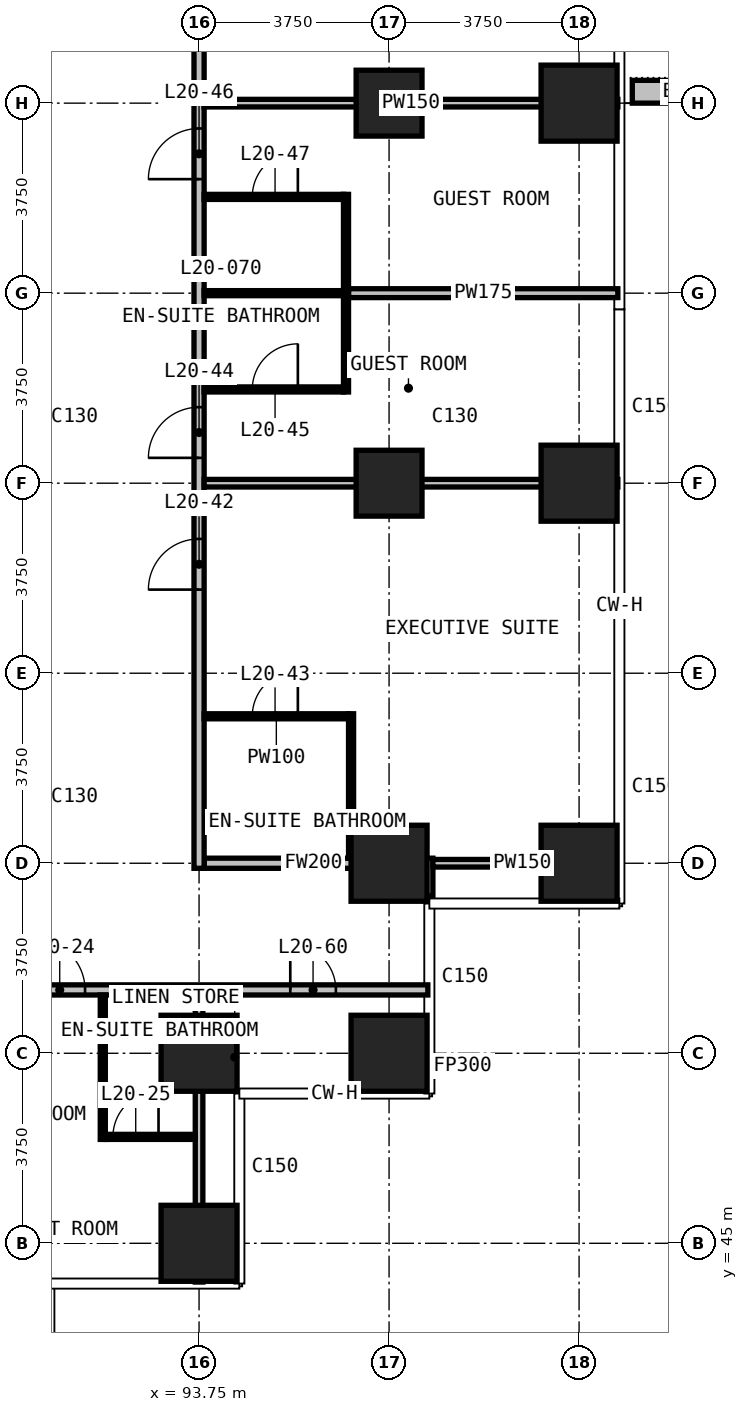
"""IFC4 building model, lengths in metres.
Left out: names, types, materials, properties, quantities, classifications, styles, units other than length and angle.
Written with IfcOpenShell. Run it as: python <this file> out.ifc"""

import sys

from ifc_helpers import new_model, si_unit, direction, frame, frame_2d, origin, origin_2d, place, context, subcontext, project, spatial, rectangle, extrude, element, fill, save


model = new_model("IFC4")
c1 = context("Model", 3, precision=1e-05, world=origin(), true_north=direction((0.0, 1.0)))
c2 = subcontext(c1, "Body", "Model", "MODEL_VIEW")
j1 = project(units=[si_unit("LENGTHUNIT", "METRE"), si_unit("PLANEANGLEUNIT", "RADIAN")], contexts=[c1])
p1 = place(None, origin())
s1 = spatial("IfcSite", under=j1, at=p1, CompositionType="ELEMENT")
p2 = place(p1, origin())
s2 = spatial("IfcBuilding", under=s1, at=p2, CompositionType="ELEMENT")
p3 = place(p2, frame((0.0, 0.0, 85.7)))
s3 = spatial("IfcBuildingStorey", under=s2, at=p3, CompositionType="ELEMENT", Elevation=85.7)
for number, where, z_axis, x_axis in (
    (1, (93.75, 45.0, 0.0), (0.0, 0.0, 1.0), (1.0, 0.0, 0.0)),
    (2, (93.75, 48.75, 0.0), (0.0, 0.0, 1.0), (1.0, 0.0, 0.0)),
    (3, (97.5, 48.75, 0.0), (0.0, 0.0, 1.0), (1.0, 0.0, 0.0)),
    (4, (97.5, 52.5, 0.0), (0.0, 0.0, 1.0), (1.0, 0.0, 0.0)),
):
    element("IfcColumn", number, at=place(p3, frame(where, z_axis=z_axis, x_axis=x_axis)), inside=s3, PredefinedType="COLUMN", context=c2, shape_type="SweptSolid", body=[
        extrude(rectangle(XDim=1.5, YDim=1.5, at=origin_2d()), origin(), (0.0, 0.0, 1.0), 3.3),
    ])
for number, where, z_axis, x_axis in (
    (5, (97.5, 60.0, 0.0), (0.0, 0.0, 1.0), (1.0, 0.0, 0.0)),
    (6, (97.5, 67.5, 0.0), (0.0, 0.0, 1.0), (1.0, 0.0, 0.0)),
):
    element("IfcColumn", number, at=place(p3, frame(where, z_axis=z_axis, x_axis=x_axis)), inside=s3, PredefinedType="COLUMN", context=c2, shape_type="SweptSolid", body=[
        extrude(rectangle(XDim=1.3, YDim=1.3, at=origin_2d()), origin(), (0.0, 0.0, 1.0), 3.3),
    ])
for number, where, z_axis, x_axis in (
    (7, (101.25, 52.5, 0.0), (0.0, 0.0, 1.0), (1.0, 0.0, 0.0)),
    (8, (101.25, 60.0, 0.0), (0.0, 0.0, 1.0), (1.0, 0.0, 0.0)),
    (9, (101.25, 67.5, 0.0), (0.0, 0.0, 1.0), (1.0, 0.0, 0.0)),
):
    element("IfcColumn", number, at=place(p3, frame(where, z_axis=z_axis, x_axis=x_axis)), inside=s3, PredefinedType="COLUMN", context=c2, shape_type="SweptSolid", body=[
        extrude(rectangle(XDim=1.5, YDim=1.5, at=origin_2d()), origin(), (0.0, 0.0, 1.0), 3.3),
    ])
p4 = place(p3, frame((102.3, 67.725, 0.0), z_axis=(0.0, 0.0, 1.0), x_axis=(1.0, 0.0, 0.0)))
e10 = element("IfcWall", 10, at=p4, inside=s3, PredefinedType="USERDEFINED", context=c2, shape_type="SweptSolid", body=[
    extrude(rectangle(XDim=2.35, YDim=0.45, at=frame_2d((1.175, 0.0))), origin(), (0.0, 0.0, 1.0), 1.1),
])
p5 = place(p3, frame((51.735, 50.0, 0.0), z_axis=(0.0, 0.0, 1.0), x_axis=(1.0, 0.0, 0.0)))
e11 = element("IfcWall", 11, at=p5, inside=s3, PredefinedType="PARTITIONING", context=c2, shape_type="SweptSolid", body=[
    extrude(rectangle(XDim=46.53, YDim=0.2, at=frame_2d((23.265, 0.0))), origin(), (0.0, 0.0, 1.0), 3.0),
])
p6 = place(p5, frame((6.765, 0.0, 0.0)))
e12 = element("IfcOpeningElement", 12, at=p6, cuts=e11, PredefinedType="OPENING", context=c2, shape_type="SweptSolid", body=[
    extrude(rectangle(XDim=1.0, YDim=2.2, at=frame_2d((0.5, 1.1))), frame((0.0, 0.11, 0.0), z_axis=(0.0, -1.0, 0.0), x_axis=(1.0, 0.0, 0.0)), (0.0, 0.0, 1.0), 0.22),
])
p7 = place(p5, frame((10.515, 0.0, 0.0)))
e13 = element("IfcOpeningElement", 13, at=p7, cuts=e11, PredefinedType="OPENING", context=c2, shape_type="SweptSolid", body=[
    extrude(rectangle(XDim=1.0, YDim=2.2, at=frame_2d((0.5, 1.1))), frame((0.0, 0.11, 0.0), z_axis=(0.0, -1.0, 0.0), x_axis=(1.0, 0.0, 0.0)), (0.0, 0.0, 1.0), 0.22),
])
p8 = place(p5, frame((12.515, 0.0, 0.0)))
e14 = element("IfcOpeningElement", 14, at=p8, cuts=e11, PredefinedType="OPENING", context=c2, shape_type="SweptSolid", body=[
    extrude(rectangle(XDim=1.0, YDim=2.2, at=frame_2d((0.5, 1.1))), frame((0.0, 0.11, 0.0), z_axis=(0.0, -1.0, 0.0), x_axis=(1.0, 0.0, 0.0)), (0.0, 0.0, 1.0), 0.22),
])
p9 = place(p5, frame((18.015, 0.0, 0.0)))
e15 = element("IfcOpeningElement", 15, at=p9, cuts=e11, PredefinedType="OPENING", context=c2, shape_type="SweptSolid", body=[
    extrude(rectangle(XDim=1.0, YDim=2.2, at=frame_2d((0.5, 1.1))), frame((0.0, 0.11, 0.0), z_axis=(0.0, -1.0, 0.0), x_axis=(1.0, 0.0, 0.0)), (0.0, 0.0, 1.0), 0.22),
])
p10 = place(p5, frame((20.015, 0.0, 0.0)))
e16 = element("IfcOpeningElement", 16, at=p10, cuts=e11, PredefinedType="OPENING", context=c2, shape_type="SweptSolid", body=[
    extrude(rectangle(XDim=1.0, YDim=2.2, at=frame_2d((0.5, 1.1))), frame((0.0, 0.11, 0.0), z_axis=(0.0, -1.0, 0.0), x_axis=(1.0, 0.0, 0.0)), (0.0, 0.0, 1.0), 0.22),
])
p11 = place(p5, frame((25.515, 0.0, 0.0)))
e17 = element("IfcOpeningElement", 17, at=p11, cuts=e11, PredefinedType="OPENING", context=c2, shape_type="SweptSolid", body=[
    extrude(rectangle(XDim=1.0, YDim=2.2, at=frame_2d((0.5, 1.1))), frame((0.0, 0.11, 0.0), z_axis=(0.0, -1.0, 0.0), x_axis=(1.0, 0.0, 0.0)), (0.0, 0.0, 1.0), 0.22),
])
p12 = place(p5, frame((27.515, 0.0, 0.0)))
e18 = element("IfcOpeningElement", 18, at=p12, cuts=e11, PredefinedType="OPENING", context=c2, shape_type="SweptSolid", body=[
    extrude(rectangle(XDim=1.0, YDim=2.2, at=frame_2d((0.5, 1.1))), frame((0.0, 0.11, 0.0), z_axis=(0.0, -1.0, 0.0), x_axis=(1.0, 0.0, 0.0)), (0.0, 0.0, 1.0), 0.22),
])
p13 = place(p5, frame((33.015, 0.0, 0.0)))
e19 = element("IfcOpeningElement", 19, at=p13, cuts=e11, PredefinedType="OPENING", context=c2, shape_type="SweptSolid", body=[
    extrude(rectangle(XDim=1.0, YDim=2.2, at=frame_2d((0.5, 1.1))), frame((0.0, 0.11, 0.0), z_axis=(0.0, -1.0, 0.0), x_axis=(1.0, 0.0, 0.0)), (0.0, 0.0, 1.0), 0.22),
])
p14 = place(p5, frame((35.015, 0.0, 0.0)))
e20 = element("IfcOpeningElement", 20, at=p14, cuts=e11, PredefinedType="OPENING", context=c2, shape_type="SweptSolid", body=[
    extrude(rectangle(XDim=1.0, YDim=2.2, at=frame_2d((0.5, 1.1))), frame((0.0, 0.11, 0.0), z_axis=(0.0, -1.0, 0.0), x_axis=(1.0, 0.0, 0.0)), (0.0, 0.0, 1.0), 0.22),
])
p15 = place(p5, frame((38.765, 0.0, 0.0)))
e21 = element("IfcOpeningElement", 21, at=p15, cuts=e11, PredefinedType="OPENING", context=c2, shape_type="SweptSolid", body=[
    extrude(rectangle(XDim=1.0, YDim=2.2, at=frame_2d((0.5, 1.1))), frame((0.0, 0.11, 0.0), z_axis=(0.0, -1.0, 0.0), x_axis=(1.0, 0.0, 0.0)), (0.0, 0.0, 1.0), 0.22),
])
p16 = place(p5, frame((1.8, 0.0, 0.0)))
e22 = element("IfcOpeningElement", 22, at=p16, cuts=e11, PredefinedType="OPENING", context=c2, shape_type="SweptSolid", body=[
    extrude(rectangle(XDim=0.9, YDim=2.2, at=frame_2d((0.45, 1.1))), frame((0.0, 0.11, 0.0), z_axis=(0.0, -1.0, 0.0), x_axis=(1.0, 0.0, 0.0)), (0.0, 0.0, 1.0), 0.22),
])
p17 = place(p5, frame((43.815, 0.0, 0.0)))
e23 = element("IfcOpeningElement", 23, at=p17, cuts=e11, PredefinedType="OPENING", context=c2, shape_type="SweptSolid", body=[
    extrude(rectangle(XDim=0.9, YDim=2.2, at=frame_2d((0.45, 1.1))), frame((0.0, 0.11, 0.0), z_axis=(0.0, -1.0, 0.0), x_axis=(1.0, 0.0, 0.0)), (0.0, 0.0, 1.0), 0.22),
])
p18 = place(p3, frame((93.85, 52.5, 0.0), z_axis=(0.0, 0.0, 1.0), x_axis=(1.0, 0.0, 0.0)))
e24 = element("IfcWall", 24, at=p18, inside=s3, PredefinedType="PARTITIONING", context=c2, shape_type="SweptSolid", body=[
    extrude(rectangle(XDim=4.315, YDim=0.2, at=frame_2d((2.157, 0.0))), origin(), (0.0, 0.0, 1.0), 3.0),
])
p19 = place(p3, frame((93.75, 52.4, 0.0), z_axis=(0.0, 0.0, 1.0), x_axis=(0.0, 1.0, 0.0)))
e25 = element("IfcWall", 25, at=p19, inside=s3, PredefinedType="PARTITIONING", context=c2, shape_type="SweptSolid", body=[
    extrude(rectangle(XDim=38.31, YDim=0.2, at=frame_2d((19.155, 0.0))), origin(), (0.0, 0.0, 1.0), 3.0),
])
p20 = place(p19, frame((5.5, 0.0, 0.0)))
e26 = element("IfcOpeningElement", 26, at=p20, cuts=e25, PredefinedType="OPENING", context=c2, shape_type="SweptSolid", body=[
    extrude(rectangle(XDim=1.0, YDim=2.2, at=frame_2d((0.5, 1.1))), frame((0.0, 0.11, 0.0), z_axis=(0.0, -1.0, 0.0), x_axis=(1.0, 0.0, 0.0)), (0.0, 0.0, 1.0), 0.22),
])
p21 = place(p19, frame((8.1, 0.0, 0.0)))
e27 = element("IfcOpeningElement", 27, at=p21, cuts=e25, PredefinedType="OPENING", context=c2, shape_type="SweptSolid", body=[
    extrude(rectangle(XDim=1.0, YDim=2.2, at=frame_2d((0.5, 1.1))), frame((0.0, 0.11, 0.0), z_axis=(0.0, -1.0, 0.0), x_axis=(1.0, 0.0, 0.0)), (0.0, 0.0, 1.0), 0.22),
])
p22 = place(p19, frame((13.6, 0.0, 0.0)))
e28 = element("IfcOpeningElement", 28, at=p22, cuts=e25, PredefinedType="OPENING", context=c2, shape_type="SweptSolid", body=[
    extrude(rectangle(XDim=1.0, YDim=2.2, at=frame_2d((0.5, 1.1))), frame((0.0, 0.11, 0.0), z_axis=(0.0, -1.0, 0.0), x_axis=(1.0, 0.0, 0.0)), (0.0, 0.0, 1.0), 0.22),
])
p23 = place(p19, frame((16.2, 0.0, 0.0)))
e29 = element("IfcOpeningElement", 29, at=p23, cuts=e25, PredefinedType="OPENING", context=c2, shape_type="SweptSolid", body=[
    extrude(rectangle(XDim=1.0, YDim=2.2, at=frame_2d((0.5, 1.1))), frame((0.0, 0.11, 0.0), z_axis=(0.0, -1.0, 0.0), x_axis=(1.0, 0.0, 0.0)), (0.0, 0.0, 1.0), 0.22),
])
p24 = place(p19, frame((24.85, 0.0, 0.0)))
e30 = element("IfcOpeningElement", 30, at=p24, cuts=e25, PredefinedType="OPENING", context=c2, shape_type="SweptSolid", body=[
    extrude(rectangle(XDim=1.0, YDim=2.2, at=frame_2d((0.5, 1.1))), frame((0.0, 0.11, 0.0), z_axis=(0.0, -1.0, 0.0), x_axis=(1.0, 0.0, 0.0)), (0.0, 0.0, 1.0), 0.22),
])
p25 = place(p19, frame((26.85, 0.0, 0.0)))
e31 = element("IfcOpeningElement", 31, at=p25, cuts=e25, PredefinedType="OPENING", context=c2, shape_type="SweptSolid", body=[
    extrude(rectangle(XDim=1.0, YDim=2.2, at=frame_2d((0.5, 1.1))), frame((0.0, 0.11, 0.0), z_axis=(0.0, -1.0, 0.0), x_axis=(1.0, 0.0, 0.0)), (0.0, 0.0, 1.0), 0.22),
])
p26 = place(p19, frame((31.55, 0.0, 0.0)))
e32 = element("IfcOpeningElement", 32, at=p26, cuts=e25, PredefinedType="OPENING", context=c2, shape_type="SweptSolid", body=[
    extrude(rectangle(XDim=0.9, YDim=2.2, at=frame_2d((0.45, 1.1))), frame((0.0, 0.11, 0.0), z_axis=(0.0, -1.0, 0.0), x_axis=(1.0, 0.0, 0.0)), (0.0, 0.0, 1.0), 0.22),
])
p27 = place(p19, frame((35.65, 0.0, 0.0)))
e33 = element("IfcOpeningElement", 33, at=p27, cuts=e25, PredefinedType="OPENING", context=c2, shape_type="SweptSolid", body=[
    extrude(rectangle(XDim=0.9, YDim=2.2, at=frame_2d((0.45, 1.1))), frame((0.0, 0.11, 0.0), z_axis=(0.0, -1.0, 0.0), x_axis=(1.0, 0.0, 0.0)), (0.0, 0.0, 1.0), 0.22),
])
p28 = place(p3, frame((98.265, 51.855, 0.0), z_axis=(0.0, 0.0, 1.0), x_axis=(0.0, 1.0, 0.0)))
e34 = element("IfcWall", 34, at=p28, inside=s3, PredefinedType="PARTITIONING", context=c2, shape_type="SweptSolid", body=[
    extrude(rectangle(XDim=0.745, YDim=0.2, at=frame_2d((0.373, 0.0))), origin(), (0.0, 0.0, 1.0), 3.0),
])
p29 = place(p3, frame((96.7, 63.75, 0.0), z_axis=(0.0, 0.0, 1.0), x_axis=(1.0, 0.0, 0.0)))
e35 = element("IfcWall", 35, at=p29, inside=s3, PredefinedType="PARTITIONING", context=c2, shape_type="SweptSolid", body=[
    extrude(rectangle(XDim=5.315, YDim=0.175, at=frame_2d((2.657, 0.0))), origin(), (0.0, 0.0, 1.0), 3.0),
])
p30 = place(p3, frame((98.365, 52.5, 0.0), z_axis=(0.0, 0.0, 1.0), x_axis=(1.0, 0.0, 0.0)))
e36 = element("IfcWall", 36, at=p30, inside=s3, PredefinedType="PARTITIONING", context=c2, shape_type="SweptSolid", body=[
    extrude(rectangle(XDim=3.53, YDim=0.15, at=frame_2d((1.765, 0.0))), origin(), (0.0, 0.0, 1.0), 3.0),
])
for number, where, z_axis, x_axis in (
    (37, (93.85, 60.0, 0.0), (0.0, 0.0, 1.0), (1.0, 0.0, 0.0)),
    (38, (93.85, 67.5, 0.0), (0.0, 0.0, 1.0), (1.0, 0.0, 0.0)),
):
    element("IfcWall", number, at=place(p3, frame(where, z_axis=z_axis, x_axis=x_axis)), inside=s3, PredefinedType="PARTITIONING", context=c2, shape_type="SweptSolid", body=[
        extrude(rectangle(XDim=8.165, YDim=0.15, at=frame_2d((4.083, 0.0))), origin(), (0.0, 0.0, 1.0), 3.0),
    ])
p31 = place(p3, frame((93.75, 44.235, 0.0), z_axis=(0.0, 0.0, 1.0), x_axis=(0.0, 1.0, 0.0)))
e39 = element("IfcWall", 39, at=p31, inside=s3, PredefinedType="PARTITIONING", context=c2, shape_type="SweptSolid", body=[
    extrude(rectangle(XDim=5.665, YDim=0.15, at=frame_2d((2.833, 0.0))), origin(), (0.0, 0.0, 1.0), 3.0),
])
p32 = place(p3, frame((91.9, 47.1, 0.0), z_axis=(0.0, 0.0, 1.0), x_axis=(1.0, 0.0, 0.0)))
e40 = element("IfcWall", 40, at=p32, inside=s3, PredefinedType="PARTITIONING", context=c2, shape_type="SweptSolid", body=[
    extrude(rectangle(XDim=1.775, YDim=0.1, at=frame_2d((0.888, 0.0))), origin(), (0.0, 0.0, 1.0), 3.0),
])
p33 = place(p32, frame((0.15, 0.0, 0.0)))
e41 = element("IfcOpeningElement", 41, at=p33, cuts=e40, PredefinedType="OPENING", context=c2, shape_type="SweptSolid", body=[
    extrude(rectangle(XDim=0.9, YDim=2.2, at=frame_2d((0.45, 1.1))), frame((0.0, 0.06, 0.0), z_axis=(0.0, -1.0, 0.0), x_axis=(1.0, 0.0, 0.0)), (0.0, 0.0, 1.0), 0.12),
])
p34 = place(p3, frame((93.85, 55.4, 0.0), z_axis=(0.0, 0.0, 1.0), x_axis=(1.0, 0.0, 0.0)))
e42 = element("IfcWall", 42, at=p34, inside=s3, PredefinedType="PARTITIONING", context=c2, shape_type="SweptSolid", body=[
    extrude(rectangle(XDim=2.85, YDim=0.1, at=frame_2d((1.425, 0.0))), origin(), (0.0, 0.0, 1.0), 3.0),
])
p35 = place(p34, frame((0.95, 0.0, 0.0)))
e43 = element("IfcOpeningElement", 43, at=p35, cuts=e42, PredefinedType="OPENING", context=c2, shape_type="SweptSolid", body=[
    extrude(rectangle(XDim=0.9, YDim=2.2, at=frame_2d((0.45, 1.1))), frame((0.0, 0.06, 0.0), z_axis=(0.0, -1.0, 0.0), x_axis=(1.0, 0.0, 0.0)), (0.0, 0.0, 1.0), 0.12),
])
p36 = place(p3, frame((93.85, 61.85, 0.0), z_axis=(0.0, 0.0, 1.0), x_axis=(1.0, 0.0, 0.0)))
e44 = element("IfcWall", 44, at=p36, inside=s3, PredefinedType="PARTITIONING", context=c2, shape_type="SweptSolid", body=[
    extrude(rectangle(XDim=2.75, YDim=0.1, at=frame_2d((1.375, 0.0))), origin(), (0.0, 0.0, 1.0), 3.0),
])
p37 = place(p36, frame((0.95, 0.0, 0.0)))
e45 = element("IfcOpeningElement", 45, at=p37, cuts=e44, PredefinedType="OPENING", context=c2, shape_type="SweptSolid", body=[
    extrude(rectangle(XDim=0.9, YDim=2.2, at=frame_2d((0.45, 1.1))), frame((0.0, 0.06, 0.0), z_axis=(0.0, -1.0, 0.0), x_axis=(1.0, 0.0, 0.0)), (0.0, 0.0, 1.0), 0.12),
])
p38 = place(p3, frame((93.85, 63.75, 0.0), z_axis=(0.0, 0.0, 1.0), x_axis=(1.0, 0.0, 0.0)))
e46 = element("IfcWall", 46, at=p38, inside=s3, PredefinedType="PARTITIONING", context=c2, shape_type="SweptSolid", body=[
    extrude(rectangle(XDim=2.75, YDim=0.1, at=frame_2d((1.375, 0.0))), origin(), (0.0, 0.0, 1.0), 3.0),
])
p39 = place(p3, frame((93.85, 65.65, 0.0), z_axis=(0.0, 0.0, 1.0), x_axis=(1.0, 0.0, 0.0)))
e47 = element("IfcWall", 47, at=p39, inside=s3, PredefinedType="PARTITIONING", context=c2, shape_type="SweptSolid", body=[
    extrude(rectangle(XDim=2.75, YDim=0.1, at=frame_2d((1.375, 0.0))), origin(), (0.0, 0.0, 1.0), 3.0),
])
p40 = place(p39, frame((0.95, 0.0, 0.0)))
e48 = element("IfcOpeningElement", 48, at=p40, cuts=e47, PredefinedType="OPENING", context=c2, shape_type="SweptSolid", body=[
    extrude(rectangle(XDim=0.9, YDim=2.2, at=frame_2d((0.45, 1.1))), frame((0.0, 0.06, 0.0), z_axis=(0.0, -1.0, 0.0), x_axis=(1.0, 0.0, 0.0)), (0.0, 0.0, 1.0), 0.12),
])
p41 = place(p3, frame((91.85, 47.05, 0.0), z_axis=(0.0, 0.0, 1.0), x_axis=(0.0, 1.0, 0.0)))
e49 = element("IfcWall", 49, at=p41, inside=s3, PredefinedType="PARTITIONING", context=c2, shape_type="SweptSolid", body=[
    extrude(rectangle(XDim=2.85, YDim=0.1, at=frame_2d((1.425, 0.0))), origin(), (0.0, 0.0, 1.0), 3.0),
])
p42 = place(p3, frame((96.65, 61.8, 0.0), z_axis=(0.0, 0.0, 1.0), x_axis=(0.0, 1.0, 0.0)))
e50 = element("IfcWall", 50, at=p42, inside=s3, PredefinedType="PARTITIONING", context=c2, shape_type="SweptSolid", body=[
    extrude(rectangle(XDim=3.9, YDim=0.1, at=frame_2d((1.95, 0.0))), origin(), (0.0, 0.0, 1.0), 3.0),
])
p43 = place(p3, frame((96.75, 52.6, 0.0), z_axis=(0.0, 0.0, 1.0), x_axis=(0.0, 1.0, 0.0)))
e51 = element("IfcWall", 51, at=p43, inside=s3, PredefinedType="PARTITIONING", context=c2, shape_type="SweptSolid", body=[
    extrude(rectangle(XDim=2.85, YDim=0.1, at=frame_2d((1.425, 0.0))), origin(), (0.0, 0.0, 1.0), 3.0),
])
p44 = place(p15, origin())
e52 = element("IfcDoor", 52, at=p44, inside=s3, OperationType="SINGLE_SWING_LEFT", PredefinedType="DOOR", context=c2, shape_type="SweptSolid", body=[
    extrude(rectangle(XDim=1.0, YDim=2.2, at=frame_2d((0.5, 1.1))), frame((0.0, 0.025, 0.0), z_axis=(0.0, -1.0, 0.0), x_axis=(1.0, 0.0, 0.0)), (0.0, 0.0, 1.0), 0.05),
])
fill(e21, e52)
p45 = place(p33, origin())
e53 = element("IfcDoor", 53, at=p45, inside=s3, OperationType="SINGLE_SWING_RIGHT", PredefinedType="DOOR", context=c2, shape_type="SweptSolid", body=[
    extrude(rectangle(XDim=0.9, YDim=2.2, at=frame_2d((0.45, 1.1))), frame((0.0, 0.025, 0.0), z_axis=(0.0, -1.0, 0.0), x_axis=(1.0, 0.0, 0.0)), (0.0, 0.0, 1.0), 0.05),
])
fill(e41, e53)
p46 = place(p20, origin())
e54 = element("IfcDoor", 54, at=p46, inside=s3, OperationType="SINGLE_SWING_LEFT", PredefinedType="DOOR", context=c2, shape_type="SweptSolid", body=[
    extrude(rectangle(XDim=1.0, YDim=2.2, at=frame_2d((0.5, 1.1))), frame((0.0, 0.025, 0.0), z_axis=(0.0, -1.0, 0.0), x_axis=(1.0, 0.0, 0.0)), (0.0, 0.0, 1.0), 0.05),
])
fill(e26, e54)
p47 = place(p35, origin())
e55 = element("IfcDoor", 55, at=p47, inside=s3, OperationType="SINGLE_SWING_RIGHT", PredefinedType="DOOR", context=c2, shape_type="SweptSolid", body=[
    extrude(rectangle(XDim=0.9, YDim=2.2, at=frame_2d((0.45, 1.1))), frame((0.0, 0.025, 0.0), z_axis=(0.0, -1.0, 0.0), x_axis=(1.0, 0.0, 0.0)), (0.0, 0.0, 1.0), 0.05),
])
fill(e43, e55)
p48 = place(p21, origin())
e56 = element("IfcDoor", 56, at=p48, inside=s3, OperationType="SINGLE_SWING_LEFT", PredefinedType="DOOR", context=c2, shape_type="SweptSolid", body=[
    extrude(rectangle(XDim=1.0, YDim=2.2, at=frame_2d((0.5, 1.1))), frame((0.0, 0.025, 0.0), z_axis=(0.0, -1.0, 0.0), x_axis=(1.0, 0.0, 0.0)), (0.0, 0.0, 1.0), 0.05),
])
fill(e27, e56)
p49 = place(p37, origin())
e57 = element("IfcDoor", 57, at=p49, inside=s3, OperationType="SINGLE_SWING_RIGHT", PredefinedType="DOOR", context=c2, shape_type="SweptSolid", body=[
    extrude(rectangle(XDim=0.9, YDim=2.2, at=frame_2d((0.45, 1.1))), frame((0.0, 0.025, 0.0), z_axis=(0.0, -1.0, 0.0), x_axis=(1.0, 0.0, 0.0)), (0.0, 0.0, 1.0), 0.05),
])
fill(e45, e57)
p50 = place(p22, origin())
e58 = element("IfcDoor", 58, at=p50, inside=s3, OperationType="SINGLE_SWING_RIGHT", PredefinedType="DOOR", context=c2, shape_type="SweptSolid", body=[
    extrude(rectangle(XDim=1.0, YDim=2.2, at=frame_2d((0.5, 1.1))), frame((0.0, 0.025, 0.0), z_axis=(0.0, -1.0, 0.0), x_axis=(1.0, 0.0, 0.0)), (0.0, 0.0, 1.0), 0.05),
])
fill(e28, e58)
p51 = place(p40, origin())
e59 = element("IfcDoor", 59, at=p51, inside=s3, OperationType="SINGLE_SWING_RIGHT", PredefinedType="DOOR", context=c2, shape_type="SweptSolid", body=[
    extrude(rectangle(XDim=0.9, YDim=2.2, at=frame_2d((0.45, 1.1))), frame((0.0, 0.025, 0.0), z_axis=(0.0, -1.0, 0.0), x_axis=(1.0, 0.0, 0.0)), (0.0, 0.0, 1.0), 0.05),
])
fill(e48, e59)
p52 = place(p17, origin())
e60 = element("IfcDoor", 60, at=p52, inside=s3, OperationType="SINGLE_SWING_LEFT", PredefinedType="DOOR", context=c2, shape_type="SweptSolid", body=[
    extrude(rectangle(XDim=0.9, YDim=2.2, at=frame_2d((0.45, 1.1))), frame((0.0, 0.025, 0.0), z_axis=(0.0, -1.0, 0.0), x_axis=(1.0, 0.0, 0.0)), (0.0, 0.0, 1.0), 0.05),
])
fill(e23, e60)
save(model, sys.argv[1])
